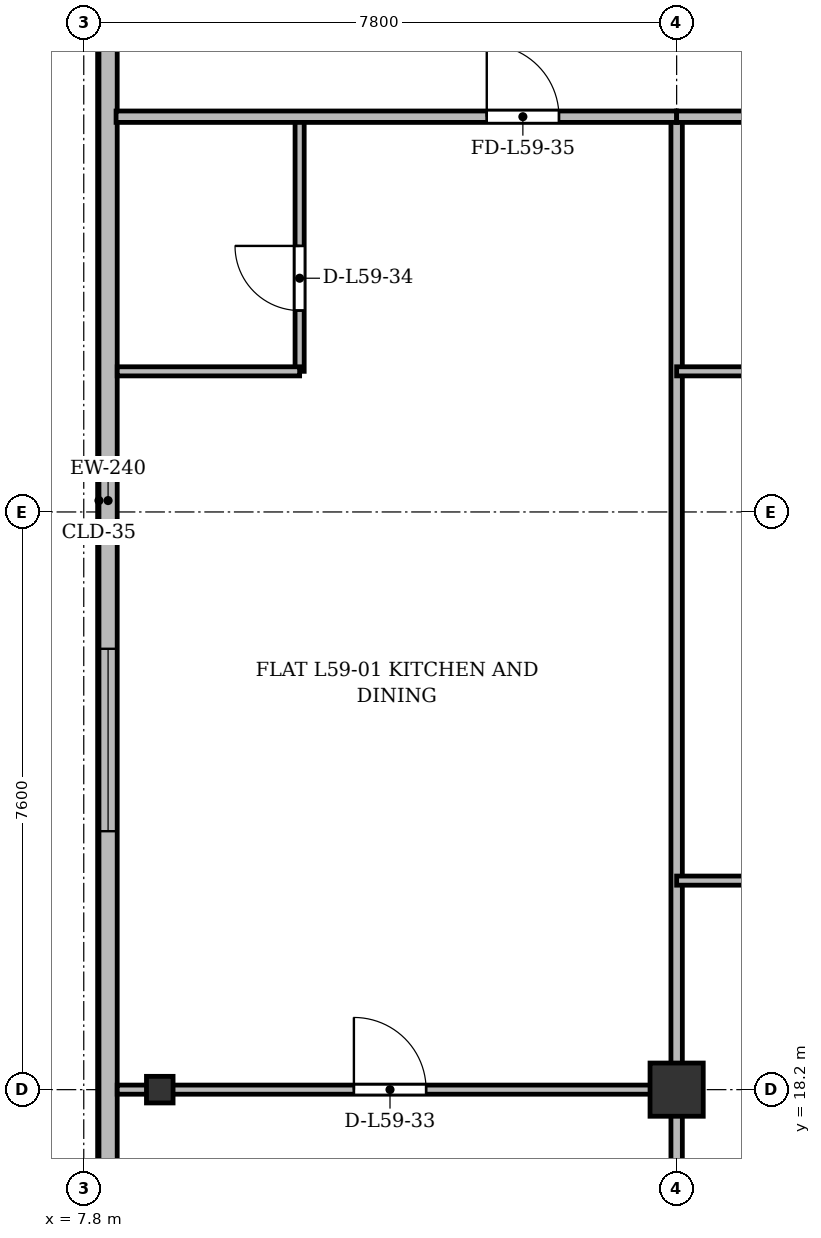
"""IFC4 building model, lengths in metres.
Left out: names, types, materials, properties, quantities, classifications, styles, units other than length and angle.
Written with IfcOpenShell. Run it as: python <this file> out.ifc"""

import sys

from ifc_helpers import new_model, si_unit, direction, frame, frame_2d, origin, origin_2d, place, context, subcontext, project, spatial, rectangle, i_section, extrude, source, transform, mapped, element, fill, save


model = new_model("IFC4")
c1 = context("Model", 3, precision=1e-05, world=origin(), true_north=direction((0.0, 1.0)))
c2 = subcontext(c1, "Body", "Model", "MODEL_VIEW")
j1 = project(units=[si_unit("LENGTHUNIT", "METRE"), si_unit("PLANEANGLEUNIT", "RADIAN")], contexts=[c1])
p1 = place(None, origin())
s1 = spatial("IfcSite", under=j1, at=p1, CompositionType="ELEMENT")
p2 = place(p1, origin())
s2 = spatial("IfcBuilding", under=s1, at=p2, CompositionType="ELEMENT")
p3 = place(p2, frame((0.0, 0.0, 226.5)))
s3 = spatial("IfcBuildingStorey", under=s2, at=p3, CompositionType="ELEMENT", Elevation=226.5)
m1 = source(origin(), c2, "Body", "SweptSolid", [
    extrude(i_section(OverallWidth=0.35, OverallDepth=0.35, WebThickness=0.018, FlangeThickness=0.028, at=origin_2d()), origin(), (0.0, 0.0, 1.0), 3.6),
])
p4 = place(p3, frame((8.8, 18.2, 0.0), z_axis=(0.0, 0.0, 1.0), x_axis=(1.0, 0.0, 0.0)))
e1 = element("IfcColumn", 1, at=p4, inside=s3, PredefinedType="COLUMN", context=c2, shape_type="MappedRepresentation", body=[
    mapped(m1, transform((0.0, 0.0, 0.0), x_axis=(1.0, 0.0, 0.0), y_axis=(0.0, 1.0, 0.0), z_axis=(0.0, 0.0, 1.0), scale=1.0)),
])
m2 = source(origin(), c2, "Body", "SweptSolid", [
    extrude(rectangle(XDim=0.7, YDim=0.7, at=origin_2d()), origin(), (0.0, 0.0, 1.0), 3.6),
])
p5 = place(p3, frame((15.6, 18.2, 0.0), z_axis=(0.0, 0.0, 1.0), x_axis=(1.0, 0.0, 0.0)))
e2 = element("IfcColumn", 2, at=p5, inside=s3, PredefinedType="COLUMN", context=c2, shape_type="MappedRepresentation", body=[
    mapped(m2, transform((0.0, 0.0, 0.0), x_axis=(1.0, 0.0, 0.0), y_axis=(0.0, 1.0, 0.0), z_axis=(0.0, 0.0, 1.0), scale=1.0)),
])
p6 = place(p3, frame((8.12, 6.4, 0.0), z_axis=(0.0, 0.0, 1.0), x_axis=(0.0, 1.0, 0.0)))
e3 = element("IfcWall", 3, at=p6, inside=s3, PredefinedType="SOLIDWALL", context=c2, shape_type="SweptSolid", body=[
    extrude(rectangle(XDim=39.1, YDim=0.24, at=frame_2d((19.55, 0.0))), origin(), (0.0, 0.0, 1.0), 3.36),
])
p7 = place(p6, frame((1.45, 0.0, 0.92)))
e4 = element("IfcOpeningElement", 4, at=p7, cuts=e3, PredefinedType="OPENING", context=c2, shape_type="SweptSolid", body=[
    extrude(rectangle(XDim=1.2, YDim=1.65, at=frame_2d((0.6, 0.825))), frame((0.0, 0.13, 0.0), z_axis=(0.0, -1.0, 0.0), x_axis=(1.0, 0.0, 0.0)), (0.0, 0.0, 1.0), 0.26),
])
p8 = place(p6, frame((3.8, 0.0, 0.92)))
e5 = element("IfcOpeningElement", 5, at=p8, cuts=e3, PredefinedType="OPENING", context=c2, shape_type="SweptSolid", body=[
    extrude(rectangle(XDim=2.4, YDim=2.1, at=frame_2d((1.2, 1.05))), frame((0.0, 0.13, 0.0), z_axis=(0.0, -1.0, 0.0), x_axis=(1.0, 0.0, 0.0)), (0.0, 0.0, 1.0), 0.26),
])
p9 = place(p6, frame((8.0, 0.0, 0.92)))
e6 = element("IfcOpeningElement", 6, at=p9, cuts=e3, PredefinedType="OPENING", context=c2, shape_type="SweptSolid", body=[
    extrude(rectangle(XDim=2.4, YDim=2.1, at=frame_2d((1.2, 1.05))), frame((0.0, 0.13, 0.0), z_axis=(0.0, -1.0, 0.0), x_axis=(1.0, 0.0, 0.0)), (0.0, 0.0, 1.0), 0.26),
])
p10 = place(p6, frame((15.2, 0.0, 0.92)))
e7 = element("IfcOpeningElement", 7, at=p10, cuts=e3, PredefinedType="OPENING", context=c2, shape_type="SweptSolid", body=[
    extrude(rectangle(XDim=2.4, YDim=2.1, at=frame_2d((1.2, 1.05))), frame((0.0, 0.13, 0.0), z_axis=(0.0, -1.0, 0.0), x_axis=(1.0, 0.0, 0.0)), (0.0, 0.0, 1.0), 0.26),
])
p11 = place(p6, frame((33.4, 0.0, 0.92)))
e8 = element("IfcOpeningElement", 8, at=p11, cuts=e3, PredefinedType="OPENING", context=c2, shape_type="SweptSolid", body=[
    extrude(rectangle(XDim=1.2, YDim=1.65, at=frame_2d((0.6, 0.825))), frame((0.0, 0.13, 0.0), z_axis=(0.0, -1.0, 0.0), x_axis=(1.0, 0.0, 0.0)), (0.0, 0.0, 1.0), 0.26),
])
p12 = place(p6, frame((36.75, 0.0, 0.92)))
e9 = element("IfcOpeningElement", 9, at=p12, cuts=e3, PredefinedType="OPENING", context=c2, shape_type="SweptSolid", body=[
    extrude(rectangle(XDim=1.2, YDim=1.65, at=frame_2d((0.6, 0.825))), frame((0.0, 0.13, 0.0), z_axis=(0.0, -1.0, 0.0), x_axis=(1.0, 0.0, 0.0)), (0.0, 0.0, 1.0), 0.26),
])
p13 = place(p3, frame((15.6, 3.625, 0.0), z_axis=(0.0, 0.0, 1.0), x_axis=(0.0, 1.0, 0.0)))
e10 = element("IfcWall", 10, at=p13, inside=s3, PredefinedType="PARTITIONING", context=c2, shape_type="SweptSolid", body=[
    extrude(rectangle(XDim=27.375, YDim=0.15, at=frame_2d((13.688, 0.0))), origin(), (0.0, 0.0, 1.0), 2.86),
])
p14 = place(p3, frame((8.24, 18.2, 0.0), z_axis=(0.0, 0.0, 1.0), x_axis=(1.0, 0.0, 0.0)))
e11 = element("IfcWall", 11, at=p14, inside=s3, PredefinedType="PARTITIONING", context=c2, shape_type="SweptSolid", body=[
    extrude(rectangle(XDim=7.36, YDim=0.12, at=frame_2d((3.68, 0.0))), origin(), (0.0, 0.0, 1.0), 2.91),
])
p15 = place(p14, frame((3.114, 0.0, 0.0)))
e12 = element("IfcOpeningElement", 12, at=p15, cuts=e11, PredefinedType="OPENING", context=c2, shape_type="SweptSolid", body=[
    extrude(rectangle(XDim=0.95, YDim=2.15, at=frame_2d((0.475, 1.075))), frame((0.0, 0.07, 0.0), z_axis=(0.0, -1.0, 0.0), x_axis=(1.0, 0.0, 0.0)), (0.0, 0.0, 1.0), 0.14),
])
p16 = place(p3, frame((10.64, 27.65, 0.0), z_axis=(0.0, 0.0, 1.0), x_axis=(0.0, 1.0, 0.0)))
e13 = element("IfcWall", 13, at=p16, inside=s3, PredefinedType="PARTITIONING", context=c2, shape_type="SweptSolid", body=[
    extrude(rectangle(XDim=3.35, YDim=0.12, at=frame_2d((1.675, 0.0))), origin(), (0.0, 0.0, 1.0), 3.36),
])
p17 = place(p16, frame((0.8, 0.0, 0.0)))
e14 = element("IfcOpeningElement", 14, at=p17, cuts=e13, PredefinedType="OPENING", context=c2, shape_type="SweptSolid", body=[
    extrude(rectangle(XDim=0.85, YDim=2.1, at=frame_2d((0.425, 1.05))), frame((0.0, 0.07, 0.0), z_axis=(0.0, -1.0, 0.0), x_axis=(1.0, 0.0, 0.0)), (0.0, 0.0, 1.0), 0.14),
])
p18 = place(p3, frame((8.24, 27.65, 0.0), z_axis=(0.0, 0.0, 1.0), x_axis=(1.0, 0.0, 0.0)))
e15 = element("IfcWall", 15, at=p18, inside=s3, PredefinedType="PARTITIONING", context=c2, shape_type="SweptSolid", body=[
    extrude(rectangle(XDim=2.4, YDim=0.12, at=frame_2d((1.2, 0.0))), origin(), (0.0, 0.0, 1.0), 2.86),
])
p19 = place(p3, frame((8.225, 31.0, 0.0), z_axis=(0.0, 0.0, 1.0), x_axis=(1.0, 0.0, 0.0)))
e16 = element("IfcWall", 16, at=p19, inside=s3, PredefinedType="PARTITIONING", context=c2, shape_type="SweptSolid", body=[
    extrude(rectangle(XDim=7.375, YDim=0.15, at=frame_2d((3.688, 0.0))), origin(), (0.0, 0.0, 1.0), 2.86),
])
p20 = place(p19, frame((4.877, 0.0, 0.0)))
e17 = element("IfcOpeningElement", 17, at=p20, cuts=e16, PredefinedType="OPENING", context=c2, shape_type="SweptSolid", body=[
    extrude(rectangle(XDim=0.95, YDim=2.15, at=frame_2d((0.475, 1.075))), frame((0.0, 0.085, 0.0), z_axis=(0.0, -1.0, 0.0), x_axis=(1.0, 0.0, 0.0)), (0.0, 0.0, 1.0), 0.17),
])
p21 = place(p3, frame((15.6, 20.95, 0.0), z_axis=(0.0, 0.0, 1.0), x_axis=(1.0, 0.0, 0.0)))
e18 = element("IfcWall", 18, at=p21, inside=s3, PredefinedType="PARTITIONING", context=c2, shape_type="SweptSolid", body=[
    extrude(rectangle(XDim=7.8, YDim=0.12, at=frame_2d((3.9, 0.0))), origin(), (0.0, 0.0, 1.0), 2.86),
])
p22 = place(p21, frame((3.333, 0.0, 0.0)))
e19 = element("IfcOpeningElement", 19, at=p22, cuts=e18, PredefinedType="OPENING", context=c2, shape_type="SweptSolid", body=[
    extrude(rectangle(XDim=0.95, YDim=2.15, at=frame_2d((0.475, 1.075))), frame((0.0, 0.07, 0.0), z_axis=(0.0, -1.0, 0.0), x_axis=(1.0, 0.0, 0.0)), (0.0, 0.0, 1.0), 0.14),
])
p23 = place(p3, frame((15.6, 27.65, 0.0), z_axis=(0.0, 0.0, 1.0), x_axis=(1.0, 0.0, 0.0)))
e20 = element("IfcWall", 20, at=p23, inside=s3, PredefinedType="PARTITIONING", context=c2, shape_type="SweptSolid", body=[
    extrude(rectangle(XDim=2.4, YDim=0.12, at=frame_2d((1.2, 0.0))), origin(), (0.0, 0.0, 1.0), 2.86),
])
p24 = place(p3, frame((15.6, 31.0, 0.0), z_axis=(0.0, 0.0, 1.0), x_axis=(1.0, 0.0, 0.0)))
e21 = element("IfcWall", 21, at=p24, inside=s3, PredefinedType="PARTITIONING", context=c2, shape_type="SweptSolid", body=[
    extrude(rectangle(XDim=7.8, YDim=0.15, at=frame_2d((3.9, 0.0))), origin(), (0.0, 0.0, 1.0), 2.86),
])
p25 = place(p24, frame((5.172, 0.0, 0.0)))
e22 = element("IfcOpeningElement", 22, at=p25, cuts=e21, PredefinedType="OPENING", context=c2, shape_type="SweptSolid", body=[
    extrude(rectangle(XDim=0.95, YDim=2.15, at=frame_2d((0.475, 1.075))), frame((0.0, 0.085, 0.0), z_axis=(0.0, -1.0, 0.0), x_axis=(1.0, 0.0, 0.0)), (0.0, 0.0, 1.0), 0.17),
])
m3 = source(origin(), c2, "Body", "SweptSolid", [
    extrude(rectangle(XDim=2.4, YDim=2.1, at=frame_2d((1.2, 1.05))), frame((0.0, 0.03, 0.0), z_axis=(0.0, -1.0, 0.0), x_axis=(1.0, 0.0, 0.0)), (0.0, 0.0, 1.0), 0.06),
])
p26 = place(p10, origin())
e23 = element("IfcWindow", 23, at=p26, inside=s3, PartitioningType="SINGLE_PANEL", PredefinedType="WINDOW", context=c2, shape_type="MappedRepresentation", body=[
    mapped(m3, transform((0.0, 0.0, 0.0), x_axis=(1.0, 0.0, 0.0), y_axis=(0.0, 1.0, 0.0), z_axis=(0.0, 0.0, 1.0), scale=1.0)),
])
fill(e7, e23)
m4 = source(origin(), c2, "Body", "SweptSolid", [
    extrude(rectangle(XDim=0.95, YDim=2.15, at=frame_2d((0.475, 1.075))), frame((0.0, 0.025, 0.0), z_axis=(0.0, -1.0, 0.0), x_axis=(1.0, 0.0, 0.0)), (0.0, 0.0, 1.0), 0.05),
])
p27 = place(p15, origin())
e24 = element("IfcDoor", 24, at=p27, inside=s3, OperationType="SINGLE_SWING_LEFT", PredefinedType="DOOR", context=c2, shape_type="MappedRepresentation", body=[
    mapped(m4, transform((0.0, 0.0, 0.0), x_axis=(1.0, 0.0, 0.0), y_axis=(0.0, 1.0, 0.0), z_axis=(0.0, 0.0, 1.0), scale=1.0)),
])
fill(e12, e24)
m5 = source(origin(), c2, "Body", "SweptSolid", [
    extrude(rectangle(XDim=0.85, YDim=2.1, at=frame_2d((0.425, 1.05))), frame((0.0, 0.025, 0.0), z_axis=(0.0, -1.0, 0.0), x_axis=(1.0, 0.0, 0.0)), (0.0, 0.0, 1.0), 0.05),
])
p28 = place(p17, origin())
e25 = element("IfcDoor", 25, at=p28, inside=s3, OperationType="SINGLE_SWING_RIGHT", PredefinedType="DOOR", context=c2, shape_type="MappedRepresentation", body=[
    mapped(m5, transform((0.0, 0.0, 0.0), x_axis=(1.0, 0.0, 0.0), y_axis=(0.0, 1.0, 0.0), z_axis=(0.0, 0.0, 1.0), scale=1.0)),
])
fill(e14, e25)
p29 = place(p20, origin())
e26 = element("IfcDoor", 26, at=p29, inside=s3, OperationType="SINGLE_SWING_LEFT", PredefinedType="DOOR", context=c2, shape_type="MappedRepresentation", body=[
    mapped(m4, transform((0.0, 0.0, 0.0), x_axis=(1.0, 0.0, 0.0), y_axis=(0.0, 1.0, 0.0), z_axis=(0.0, 0.0, 1.0), scale=1.0)),
])
fill(e17, e26)
save(model, sys.argv[1])
